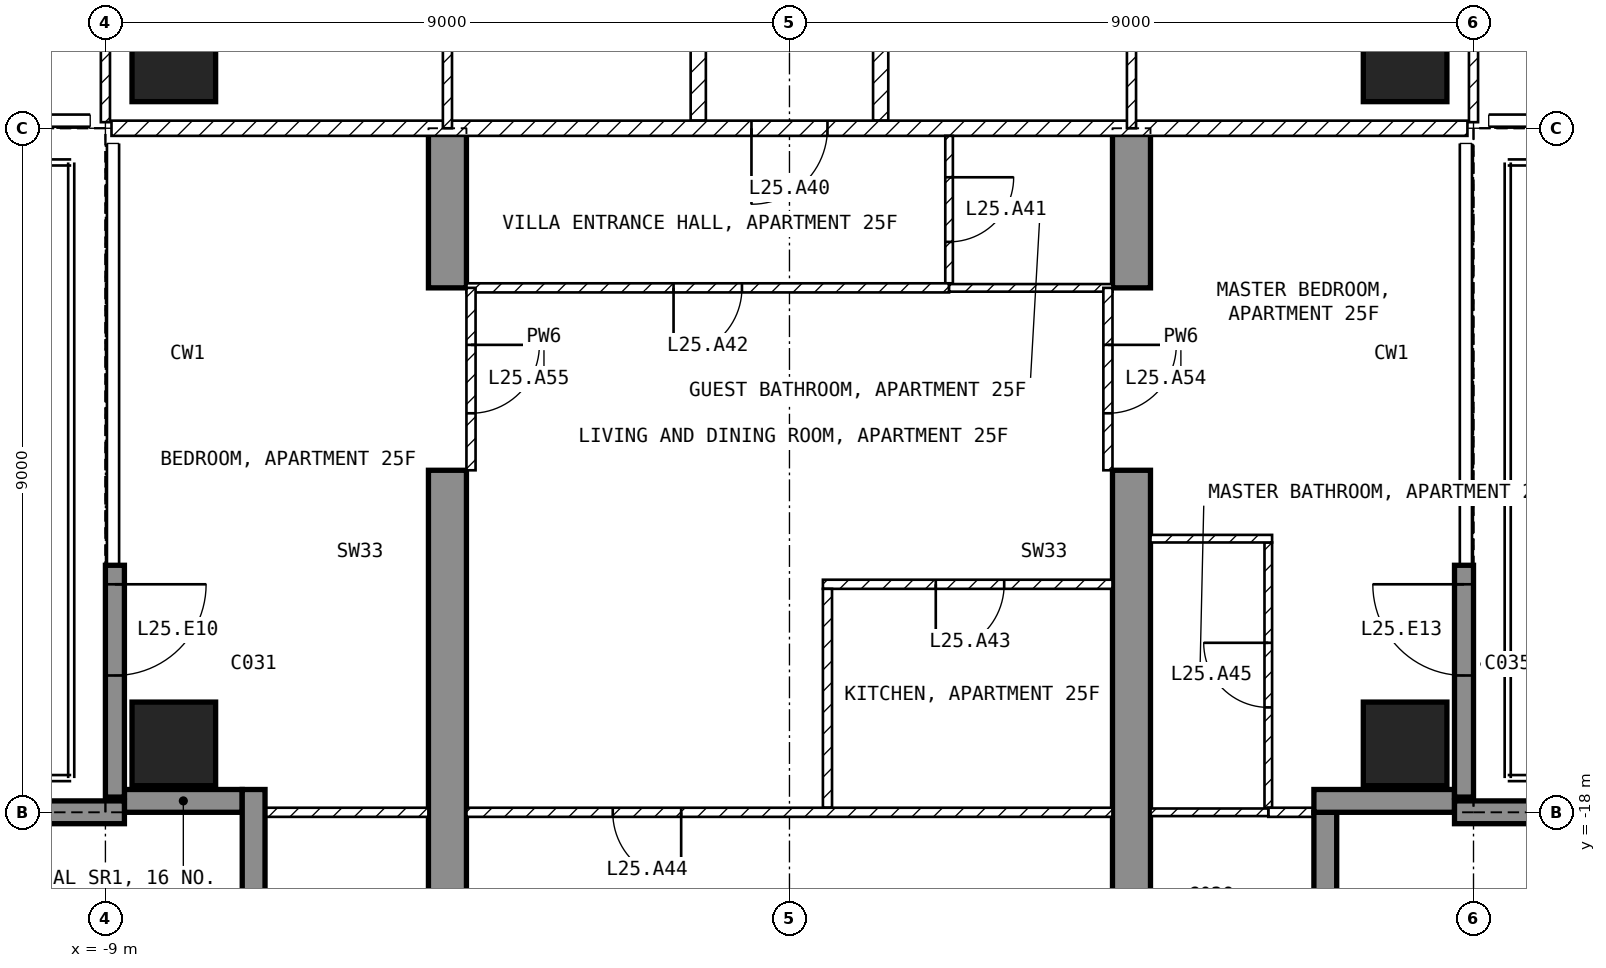
"""IFC4 building model, lengths in metres.
Left out: names, types, materials, properties, quantities, classifications, styles, units other than length and angle.
Written with IfcOpenShell. Run it as: python <this file> out.ifc"""

import sys

from ifc_helpers import new_model, si_unit, direction, frame, frame_2d, origin, origin_2d, place, context, subcontext, project, spatial, polyline, rectangle, outline, extrude, element, fill, save


model = new_model("IFC4")
c1 = context("Model", 3, precision=1e-05, world=origin(), true_north=direction((0.0, 1.0)))
c2 = subcontext(c1, "Body", "Model", "MODEL_VIEW")
j1 = project(units=[si_unit("LENGTHUNIT", "METRE"), si_unit("PLANEANGLEUNIT", "RADIAN")], contexts=[c1])
p1 = place(None, origin())
s1 = spatial("IfcSite", under=j1, at=p1, CompositionType="ELEMENT")
p2 = place(p1, origin())
s2 = spatial("IfcBuilding", under=s1, at=p2, CompositionType="ELEMENT")
p3 = place(p2, frame((0.0, 0.0, 109.4)))
s3 = spatial("IfcBuildingStorey", under=s2, at=p3, CompositionType="ELEMENT", Elevation=109.4)
for number, where, z_axis, x_axis in (
    (1, (-8.1, -17.1, -0.25), (0.0, 0.0, 1.0), (1.0, 0.0, 0.0)),
    (2, (-8.1, -8.1, -0.25), (0.0, 0.0, 1.0), (1.0, 0.0, 0.0)),
    (3, (8.1, -17.1, -0.25), (0.0, 0.0, 1.0), (1.0, 0.0, 0.0)),
    (4, (8.1, -8.1, -0.25), (0.0, 0.0, 1.0), (1.0, 0.0, 0.0)),
):
    element("IfcColumn", number, at=place(p3, frame(where, z_axis=z_axis, x_axis=x_axis)), inside=s3, PredefinedType="COLUMN", context=c2, shape_type="SweptSolid", body=[
        extrude(rectangle(XDim=1.1, YDim=1.1, at=origin_2d()), origin(), (0.0, 0.0, 1.0), 3.5),
    ])
for number, where, z_axis, x_axis in (
    (5, (-4.75, -20.15, -0.25), (1.0, 0.0, 0.0), (0.0, 1.0, 0.0)),
    (6, (4.25, -20.15, -0.25), (1.0, 0.0, 0.0), (0.0, 1.0, 0.0)),
):
    element("IfcWall", number, at=place(p3, frame(where, z_axis=z_axis, x_axis=x_axis)), inside=s3, PredefinedType="SHEAR", context=c2, shape_type="SweptSolid", body=[
        extrude(outline(polyline([(0.0, 0.0), (6.65, 0.0), (6.65, 2.65), (9.05, 2.65), (9.05, 0.0), (11.15, 0.0), (11.15, 3.5), (0.0, 3.5), (0.0, 0.0)])), origin(), (0.0, 0.0, 1.0), 0.5),
    ])
p4 = place(p3, frame((-8.875, -14.75, 0.0), z_axis=(0.0, 0.0, 1.0), x_axis=(0.0, -1.0, 0.0)))
e7 = element("IfcWall", 7, at=p4, inside=s3, PredefinedType="SOLIDWALL", context=c2, shape_type="SweptSolid", body=[
    extrude(rectangle(XDim=3.05, YDim=0.25, at=frame_2d((1.525, 0.0))), origin(), (0.0, 0.0, 1.0), 3.25),
])
p5 = place(p4, frame((0.25, 0.0, 0.0)))
e8 = element("IfcOpeningElement", 8, at=p5, cuts=e7, PredefinedType="OPENING", context=c2, shape_type="SweptSolid", body=[
    extrude(rectangle(XDim=1.2, YDim=2.4, at=frame_2d((0.6, 1.2))), frame((0.0, 0.135, 0.0), z_axis=(0.0, -1.0, 0.0), x_axis=(1.0, 0.0, 0.0)), (0.0, 0.0, 1.0), 0.27),
])
p6 = place(p3, frame((8.875, -17.8, 0.0), z_axis=(0.0, 0.0, 1.0), x_axis=(0.0, 1.0, 0.0)))
e9 = element("IfcWall", 9, at=p6, inside=s3, PredefinedType="SOLIDWALL", context=c2, shape_type="SweptSolid", body=[
    extrude(rectangle(XDim=3.05, YDim=0.25, at=frame_2d((1.525, 0.0))), origin(), (0.0, 0.0, 1.0), 3.25),
])
p7 = place(p6, frame((1.6, 0.0, 0.0)))
e10 = element("IfcOpeningElement", 10, at=p7, cuts=e9, PredefinedType="OPENING", context=c2, shape_type="SweptSolid", body=[
    extrude(rectangle(XDim=1.2, YDim=2.4, at=frame_2d((0.6, 1.2))), frame((0.0, 0.135, 0.0), z_axis=(0.0, -1.0, 0.0), x_axis=(1.0, 0.0, 0.0)), (0.0, 0.0, 1.0), 0.27),
])
p8 = place(p3, frame((7.05, -19.8, 0.0), z_axis=(0.0, 0.0, 1.0), x_axis=(0.0, 1.0, 0.0)))
e11 = element("IfcWall", 11, at=p8, inside=s3, PredefinedType="SOLIDWALL", context=c2, shape_type="SweptSolid", body=[
    extrude(rectangle(XDim=1.8, YDim=0.3, at=frame_2d((0.9, 0.0))), origin(), (0.0, 0.0, 1.0), 3.25),
])
p9 = place(p3, frame((6.9, -17.85, 0.0), z_axis=(0.0, 0.0, 1.0), x_axis=(1.0, 0.0, 0.0)))
e12 = element("IfcWall", 12, at=p9, inside=s3, PredefinedType="SOLIDWALL", context=c2, shape_type="SweptSolid", body=[
    extrude(rectangle(XDim=1.85, YDim=0.3, at=frame_2d((0.925, 0.0))), origin(), (0.0, 0.0, 1.0), 3.25),
])
p10 = place(p3, frame((-8.75, -17.85, 0.0), z_axis=(0.0, 0.0, 1.0), x_axis=(1.0, 0.0, 0.0)))
e13 = element("IfcWall", 13, at=p10, inside=s3, PredefinedType="SOLIDWALL", context=c2, shape_type="SweptSolid", body=[
    extrude(rectangle(XDim=1.55, YDim=0.3, at=frame_2d((0.775, 0.0))), origin(), (0.0, 0.0, 1.0), 3.25),
])
p11 = place(p3, frame((-7.05, -17.7, 0.0), z_axis=(0.0, 0.0, 1.0), x_axis=(0.0, -1.0, 0.0)))
e14 = element("IfcWall", 14, at=p11, inside=s3, PredefinedType="SOLIDWALL", context=c2, shape_type="SweptSolid", body=[
    extrude(rectangle(XDim=1.8, YDim=0.3, at=frame_2d((0.9, 0.0))), origin(), (0.0, 0.0, 1.0), 3.25),
])
for number, where, z_axis, x_axis in (
    (15, (-8.75, -18.0, 0.0), (0.0, 0.0, 1.0), (-1.0, 0.0, 0.0)),
    (16, (8.75, -18.0, 0.0), (0.0, 0.0, 1.0), (1.0, 0.0, 0.0)),
):
    element("IfcWall", number, at=place(p3, frame(where, z_axis=z_axis, x_axis=x_axis)), inside=s3, PredefinedType="SOLIDWALL", context=c2, shape_type="SweptSolid", body=[
        extrude(rectangle(XDim=2.99, YDim=0.3, at=frame_2d((1.495, 0.0))), origin(), (0.0, 0.0, 1.0), 3.25),
    ])
for number, where, z_axis, x_axis in (
    (17, (1.2, -4.6, 0.0), (0.0, 0.0, 1.0), (0.0, -1.0, 0.0)),
    (18, (-1.2, -8.9, 0.0), (0.0, 0.0, 1.0), (0.0, 1.0, 0.0)),
):
    element("IfcWall", number, at=place(p3, frame(where, z_axis=z_axis, x_axis=x_axis)), inside=s3, PredefinedType="PARTITIONING", context=c2, shape_type="SweptSolid", body=[
        extrude(rectangle(XDim=4.3, YDim=0.2, at=frame_2d((2.15, 0.0))), origin(), (0.0, 0.0, 1.0), 3.25),
    ])
p12 = place(p3, frame((8.92, -9.0, 0.0), z_axis=(0.0, 0.0, 1.0), x_axis=(-1.0, 0.0, 0.0)))
e19 = element("IfcWall", 19, at=p12, inside=s3, PredefinedType="PARTITIONING", context=c2, shape_type="SweptSolid", body=[
    extrude(rectangle(XDim=17.84, YDim=0.2, at=frame_2d((8.92, 0.0))), origin(), (0.0, 0.0, 1.0), 3.25),
])
p13 = place(p12, frame((8.42, 0.0, 0.0)))
e20 = element("IfcOpeningElement", 20, at=p13, cuts=e19, PredefinedType="OPENING", context=c2, shape_type="SweptSolid", body=[
    extrude(rectangle(XDim=1.0, YDim=2.1, at=frame_2d((0.5, 1.05))), frame((0.0, 0.11, 0.0), z_axis=(0.0, -1.0, 0.0), x_axis=(1.0, 0.0, 0.0)), (0.0, 0.0, 1.0), 0.22),
])
p14 = place(p3, frame((9.0, -8.92, 0.0), z_axis=(0.0, 0.0, 1.0), x_axis=(0.0, 1.0, 0.0)))
e21 = element("IfcWall", 21, at=p14, inside=s3, PredefinedType="PARTITIONING", context=c2, shape_type="SweptSolid", body=[
    extrude(rectangle(XDim=7.62, YDim=0.12, at=frame_2d((3.81, 0.0))), origin(), (0.0, 0.0, 1.0), 3.25),
])
p15 = place(p14, frame((2.52, 0.0, 0.0)))
e22 = element("IfcOpeningElement", 22, at=p15, cuts=e21, PredefinedType="OPENING", context=c2, shape_type="SweptSolid", body=[
    extrude(rectangle(XDim=0.9, YDim=2.1, at=frame_2d((0.45, 1.05))), frame((0.0, 0.07, 0.0), z_axis=(0.0, -1.0, 0.0), x_axis=(1.0, 0.0, 0.0)), (0.0, 0.0, 1.0), 0.14),
])
p16 = place(p3, frame((4.5, -9.0, 0.0), z_axis=(0.0, 0.0, 1.0), x_axis=(0.0, 1.0, 0.0)))
e23 = element("IfcWall", 23, at=p16, inside=s3, PredefinedType="PARTITIONING", context=c2, shape_type="SweptSolid", body=[
    extrude(rectangle(XDim=4.5, YDim=0.12, at=frame_2d((2.25, 0.0))), origin(), (0.0, 0.0, 1.0), 3.25),
])
p17 = place(p16, frame((1.8, 0.0, 0.0)))
e24 = element("IfcOpeningElement", 24, at=p17, cuts=e23, PredefinedType="OPENING", context=c2, shape_type="SweptSolid", body=[
    extrude(rectangle(XDim=0.9, YDim=2.1, at=frame_2d((0.45, 1.05))), frame((0.0, 0.07, 0.0), z_axis=(0.0, -1.0, 0.0), x_axis=(1.0, 0.0, 0.0)), (0.0, 0.0, 1.0), 0.14),
])
p18 = place(p3, frame((-9.0, -1.3, 0.0), z_axis=(0.0, 0.0, 1.0), x_axis=(0.0, -1.0, 0.0)))
e25 = element("IfcWall", 25, at=p18, inside=s3, PredefinedType="PARTITIONING", context=c2, shape_type="SweptSolid", body=[
    extrude(rectangle(XDim=7.62, YDim=0.12, at=frame_2d((3.81, 0.0))), origin(), (0.0, 0.0, 1.0), 3.25),
])
p19 = place(p18, frame((4.1, 0.0, 0.0)))
e26 = element("IfcOpeningElement", 26, at=p19, cuts=e25, PredefinedType="OPENING", context=c2, shape_type="SweptSolid", body=[
    extrude(rectangle(XDim=0.9, YDim=2.1, at=frame_2d((0.45, 1.05))), frame((0.0, 0.07, 0.0), z_axis=(0.0, -1.0, 0.0), x_axis=(1.0, 0.0, 0.0)), (0.0, 0.0, 1.0), 0.14),
])
p20 = place(p3, frame((-4.5, -4.5, 0.0), z_axis=(0.0, 0.0, 1.0), x_axis=(0.0, -1.0, 0.0)))
e27 = element("IfcWall", 27, at=p20, inside=s3, PredefinedType="PARTITIONING", context=c2, shape_type="SweptSolid", body=[
    extrude(rectangle(XDim=4.5, YDim=0.12, at=frame_2d((2.25, 0.0))), origin(), (0.0, 0.0, 1.0), 3.25),
])
p21 = place(p20, frame((1.8, 0.0, 0.0)))
e28 = element("IfcOpeningElement", 28, at=p21, cuts=e27, PredefinedType="OPENING", context=c2, shape_type="SweptSolid", body=[
    extrude(rectangle(XDim=0.9, YDim=2.1, at=frame_2d((0.45, 1.05))), frame((0.0, 0.07, 0.0), z_axis=(0.0, -1.0, 0.0), x_axis=(1.0, 0.0, 0.0)), (0.0, 0.0, 1.0), 0.14),
])
p22 = place(p3, frame((2.1, -9.1, 0.0), z_axis=(0.0, 0.0, 1.0), x_axis=(0.0, -1.0, 0.0)))
e29 = element("IfcWall", 29, at=p22, inside=s3, PredefinedType="PARTITIONING", context=c2, shape_type="SweptSolid", body=[
    extrude(rectangle(XDim=1.94, YDim=0.1, at=frame_2d((0.97, 0.0))), origin(), (0.0, 0.0, 1.0), 3.25),
])
p23 = place(p22, frame((0.545, 0.0, 0.0)))
e30 = element("IfcOpeningElement", 30, at=p23, cuts=e29, PredefinedType="OPENING", context=c2, shape_type="SweptSolid", body=[
    extrude(rectangle(XDim=0.85, YDim=2.1, at=frame_2d((0.425, 1.05))), frame((0.0, 0.06, 0.0), z_axis=(0.0, -1.0, 0.0), x_axis=(1.0, 0.0, 0.0)), (0.0, 0.0, 1.0), 0.12),
])
p24 = place(p3, frame((2.1, -11.1, 0.0), z_axis=(0.0, 0.0, 1.0), x_axis=(-1.0, 0.0, 0.0)))
e31 = element("IfcWall", 31, at=p24, inside=s3, PredefinedType="PARTITIONING", context=c2, shape_type="SweptSolid", body=[
    extrude(rectangle(XDim=6.35, YDim=0.12, at=frame_2d((3.175, 0.0))), origin(), (0.0, 0.0, 1.0), 3.25),
])
p25 = place(p24, frame((2.725, 0.0, 0.0)))
e32 = element("IfcOpeningElement", 32, at=p25, cuts=e31, PredefinedType="OPENING", context=c2, shape_type="SweptSolid", body=[
    extrude(rectangle(XDim=0.9, YDim=2.1, at=frame_2d((0.45, 1.05))), frame((0.0, 0.07, 0.0), z_axis=(0.0, -1.0, 0.0), x_axis=(1.0, 0.0, 0.0)), (0.0, 0.0, 1.0), 0.14),
])
p26 = place(p3, frame((4.25, -11.1, 0.0), z_axis=(0.0, 0.0, 1.0), x_axis=(-1.0, 0.0, 0.0)))
e33 = element("IfcWall", 33, at=p26, inside=s3, PredefinedType="PARTITIONING", context=c2, shape_type="SweptSolid", body=[
    extrude(rectangle(XDim=2.15, YDim=0.1, at=frame_2d((1.075, 0.0))), origin(), (0.0, 0.0, 1.0), 3.25),
])
p27 = place(p3, frame((4.25, -15.0, 0.0), z_axis=(0.0, 0.0, 1.0), x_axis=(-1.0, 0.0, 0.0)))
e34 = element("IfcWall", 34, at=p27, inside=s3, PredefinedType="PARTITIONING", context=c2, shape_type="SweptSolid", body=[
    extrude(rectangle(XDim=3.81, YDim=0.12, at=frame_2d((1.905, 0.0))), origin(), (0.0, 0.0, 1.0), 3.25),
])
p28 = place(p27, frame((1.425, 0.0, 0.0)))
e35 = element("IfcOpeningElement", 35, at=p28, cuts=e34, PredefinedType="OPENING", context=c2, shape_type="SweptSolid", body=[
    extrude(rectangle(XDim=0.9, YDim=2.1, at=frame_2d((0.45, 1.05))), frame((0.0, 0.07, 0.0), z_axis=(0.0, -1.0, 0.0), x_axis=(1.0, 0.0, 0.0)), (0.0, 0.0, 1.0), 0.14),
])
p29 = place(p3, frame((0.5, -15.06, 0.0), z_axis=(0.0, 0.0, 1.0), x_axis=(0.0, -1.0, 0.0)))
e36 = element("IfcWall", 36, at=p29, inside=s3, PredefinedType="PARTITIONING", context=c2, shape_type="SweptSolid", body=[
    extrude(rectangle(XDim=2.88, YDim=0.12, at=frame_2d((1.44, 0.0))), origin(), (0.0, 0.0, 1.0), 3.25),
])
p30 = place(p3, frame((4.25, -18.0, 0.0), z_axis=(0.0, 0.0, 1.0), x_axis=(-1.0, 0.0, 0.0)))
e37 = element("IfcWall", 37, at=p30, inside=s3, PredefinedType="PARTITIONING", context=c2, shape_type="SweptSolid", body=[
    extrude(rectangle(XDim=8.5, YDim=0.12, at=frame_2d((4.25, 0.0))), origin(), (0.0, 0.0, 1.0), 3.25),
])
p31 = place(p30, frame((5.675, 0.0, 0.0)))
e38 = element("IfcOpeningElement", 38, at=p31, cuts=e37, PredefinedType="OPENING", context=c2, shape_type="SweptSolid", body=[
    extrude(rectangle(XDim=0.9, YDim=2.1, at=frame_2d((0.45, 1.05))), frame((0.0, 0.07, 0.0), z_axis=(0.0, -1.0, 0.0), x_axis=(1.0, 0.0, 0.0)), (0.0, 0.0, 1.0), 0.14),
])
p32 = place(p3, frame((6.3, -17.94, 0.0), z_axis=(0.0, 0.0, 1.0), x_axis=(0.0, 1.0, 0.0)))
e39 = element("IfcWall", 39, at=p32, inside=s3, PredefinedType="PARTITIONING", context=c2, shape_type="SweptSolid", body=[
    extrude(rectangle(XDim=3.49, YDim=0.1, at=frame_2d((1.745, 0.0))), origin(), (0.0, 0.0, 1.0), 3.25),
])
p33 = place(p32, frame((1.32, 0.0, 0.0)))
e40 = element("IfcOpeningElement", 40, at=p33, cuts=e39, PredefinedType="OPENING", context=c2, shape_type="SweptSolid", body=[
    extrude(rectangle(XDim=0.85, YDim=2.1, at=frame_2d((0.425, 1.05))), frame((0.0, 0.06, 0.0), z_axis=(0.0, -1.0, 0.0), x_axis=(1.0, 0.0, 0.0)), (0.0, 0.0, 1.0), 0.12),
])
p34 = place(p3, frame((6.35, -14.4, 0.0), z_axis=(0.0, 0.0, 1.0), x_axis=(-1.0, 0.0, 0.0)))
e41 = element("IfcWall", 41, at=p34, inside=s3, PredefinedType="PARTITIONING", context=c2, shape_type="SweptSolid", body=[
    extrude(rectangle(XDim=1.6, YDim=0.1, at=frame_2d((0.8, 0.0))), origin(), (0.0, 0.0, 1.0), 3.25),
])
p35 = place(p3, frame((7.12, -18.0, 0.0), z_axis=(0.0, 0.0, 1.0), x_axis=(-1.0, 0.0, 0.0)))
e42 = element("IfcWall", 42, at=p35, inside=s3, PredefinedType="PARTITIONING", context=c2, shape_type="SweptSolid", body=[
    extrude(rectangle(XDim=0.82, YDim=0.12, at=frame_2d((0.41, 0.0))), origin(), (0.0, 0.0, 1.0), 3.25),
])
p36 = place(p3, frame((6.3, -18.0, 0.0), z_axis=(0.0, 0.0, 1.0), x_axis=(-1.0, 0.0, 0.0)))
e43 = element("IfcWall", 43, at=p36, inside=s3, PredefinedType="PARTITIONING", context=c2, shape_type="SweptSolid", body=[
    extrude(rectangle(XDim=1.55, YDim=0.1, at=frame_2d((0.775, 0.0))), origin(), (0.0, 0.0, 1.0), 3.25),
])
p37 = place(p3, frame((-4.75, -18.0, 0.0), z_axis=(0.0, 0.0, 1.0), x_axis=(-1.0, 0.0, 0.0)))
e44 = element("IfcWall", 44, at=p37, inside=s3, PredefinedType="PARTITIONING", context=c2, shape_type="SweptSolid", body=[
    extrude(rectangle(XDim=2.37, YDim=0.12, at=frame_2d((1.185, 0.0))), origin(), (0.0, 0.0, 1.0), 3.25),
])
p38 = place(p3, frame((4.19, -11.1, 0.0), z_axis=(0.0, 0.0, 1.0), x_axis=(0.0, -1.0, 0.0)))
e45 = element("IfcWall", 45, at=p38, inside=s3, PredefinedType="PARTITIONING", context=c2, shape_type="SweptSolid", body=[
    extrude(rectangle(XDim=2.4, YDim=0.12, at=frame_2d((1.2, 0.0))), origin(), (0.0, 0.0, 1.0), 2.4),
])
p39 = place(p38, frame((0.75, 0.0, 0.0)))
e46 = element("IfcOpeningElement", 46, at=p39, cuts=e45, PredefinedType="OPENING", context=c2, shape_type="SweptSolid", body=[
    extrude(rectangle(XDim=0.9, YDim=2.1, at=frame_2d((0.45, 1.05))), frame((0.0, 0.07, 0.0), z_axis=(0.0, -1.0, 0.0), x_axis=(1.0, 0.0, 0.0)), (0.0, 0.0, 1.0), 0.14),
])
p40 = place(p3, frame((-4.19, -11.1, 0.0), z_axis=(0.0, 0.0, 1.0), x_axis=(0.0, -1.0, 0.0)))
e47 = element("IfcWall", 47, at=p40, inside=s3, PredefinedType="PARTITIONING", context=c2, shape_type="SweptSolid", body=[
    extrude(rectangle(XDim=2.4, YDim=0.12, at=frame_2d((1.2, 0.0))), origin(), (0.0, 0.0, 1.0), 2.4),
])
p41 = place(p40, frame((0.75, 0.0, 0.0)))
e48 = element("IfcOpeningElement", 48, at=p41, cuts=e47, PredefinedType="OPENING", context=c2, shape_type="SweptSolid", body=[
    extrude(rectangle(XDim=0.9, YDim=2.1, at=frame_2d((0.45, 1.05))), frame((0.0, 0.07, 0.0), z_axis=(0.0, -1.0, 0.0), x_axis=(1.0, 0.0, 0.0)), (0.0, 0.0, 1.0), 0.14),
])
p42 = place(p5, origin())
e49 = element("IfcDoor", 49, at=p42, inside=s3, OperationType="SINGLE_SWING_LEFT", PredefinedType="DOOR", context=c2, shape_type="SweptSolid", body=[
    extrude(rectangle(XDim=1.2, YDim=2.4, at=frame_2d((0.6, 1.2))), frame((0.0, 0.025, 0.0), z_axis=(0.0, -1.0, 0.0), x_axis=(1.0, 0.0, 0.0)), (0.0, 0.0, 1.0), 0.05),
])
fill(e8, e49)
p43 = place(p7, origin())
e50 = element("IfcDoor", 50, at=p43, inside=s3, OperationType="SINGLE_SWING_RIGHT", PredefinedType="DOOR", context=c2, shape_type="SweptSolid", body=[
    extrude(rectangle(XDim=1.2, YDim=2.4, at=frame_2d((0.6, 1.2))), frame((0.0, 0.025, 0.0), z_axis=(0.0, -1.0, 0.0), x_axis=(1.0, 0.0, 0.0)), (0.0, 0.0, 1.0), 0.05),
])
fill(e10, e50)
p44 = place(p13, origin())
e51 = element("IfcDoor", 51, at=p44, inside=s3, OperationType="SINGLE_SWING_RIGHT", PredefinedType="DOOR", context=c2, shape_type="SweptSolid", body=[
    extrude(rectangle(XDim=1.0, YDim=2.1, at=frame_2d((0.5, 1.05))), frame((0.0, 0.025, 0.0), z_axis=(0.0, -1.0, 0.0), x_axis=(1.0, 0.0, 0.0)), (0.0, 0.0, 1.0), 0.05),
])
fill(e20, e51)
p45 = place(p23, origin())
e52 = element("IfcDoor", 52, at=p45, inside=s3, OperationType="SINGLE_SWING_LEFT", PredefinedType="DOOR", context=c2, shape_type="SweptSolid", body=[
    extrude(rectangle(XDim=0.85, YDim=2.1, at=frame_2d((0.425, 1.05))), frame((0.0, 0.025, 0.0), z_axis=(0.0, -1.0, 0.0), x_axis=(1.0, 0.0, 0.0)), (0.0, 0.0, 1.0), 0.05),
])
fill(e30, e52)
p46 = place(p25, origin())
e53 = element("IfcDoor", 53, at=p46, inside=s3, OperationType="SINGLE_SWING_RIGHT", PredefinedType="DOOR", context=c2, shape_type="SweptSolid", body=[
    extrude(rectangle(XDim=0.9, YDim=2.1, at=frame_2d((0.45, 1.05))), frame((0.0, 0.025, 0.0), z_axis=(0.0, -1.0, 0.0), x_axis=(1.0, 0.0, 0.0)), (0.0, 0.0, 1.0), 0.05),
])
fill(e32, e53)
p47 = place(p28, origin())
e54 = element("IfcDoor", 54, at=p47, inside=s3, OperationType="SINGLE_SWING_RIGHT", PredefinedType="DOOR", context=c2, shape_type="SweptSolid", body=[
    extrude(rectangle(XDim=0.9, YDim=2.1, at=frame_2d((0.45, 1.05))), frame((0.0, 0.025, 0.0), z_axis=(0.0, -1.0, 0.0), x_axis=(1.0, 0.0, 0.0)), (0.0, 0.0, 1.0), 0.05),
])
fill(e35, e54)
p48 = place(p31, origin())
e55 = element("IfcDoor", 55, at=p48, inside=s3, OperationType="SINGLE_SWING_LEFT", PredefinedType="DOOR", context=c2, shape_type="SweptSolid", body=[
    extrude(rectangle(XDim=0.9, YDim=2.1, at=frame_2d((0.45, 1.05))), frame((0.0, 0.025, 0.0), z_axis=(0.0, -1.0, 0.0), x_axis=(1.0, 0.0, 0.0)), (0.0, 0.0, 1.0), 0.05),
])
fill(e38, e55)
p49 = place(p33, origin())
e56 = element("IfcDoor", 56, at=p49, inside=s3, OperationType="SINGLE_SWING_RIGHT", PredefinedType="DOOR", context=c2, shape_type="SweptSolid", body=[
    extrude(rectangle(XDim=0.85, YDim=2.1, at=frame_2d((0.425, 1.05))), frame((0.0, 0.025, 0.0), z_axis=(0.0, -1.0, 0.0), x_axis=(1.0, 0.0, 0.0)), (0.0, 0.0, 1.0), 0.05),
])
fill(e40, e56)
p50 = place(p39, origin())
e57 = element("IfcDoor", 57, at=p50, inside=s3, OperationType="SINGLE_SWING_LEFT", PredefinedType="DOOR", context=c2, shape_type="SweptSolid", body=[
    extrude(rectangle(XDim=0.9, YDim=2.1, at=frame_2d((0.45, 1.05))), frame((0.0, 0.025, 0.0), z_axis=(0.0, -1.0, 0.0), x_axis=(1.0, 0.0, 0.0)), (0.0, 0.0, 1.0), 0.05),
])
fill(e46, e57)
p51 = place(p41, origin())
e58 = element("IfcDoor", 58, at=p51, inside=s3, OperationType="SINGLE_SWING_LEFT", PredefinedType="DOOR", context=c2, shape_type="SweptSolid", body=[
    extrude(rectangle(XDim=0.9, YDim=2.1, at=frame_2d((0.45, 1.05))), frame((0.0, 0.025, 0.0), z_axis=(0.0, -1.0, 0.0), x_axis=(1.0, 0.0, 0.0)), (0.0, 0.0, 1.0), 0.05),
])
fill(e48, e58)
save(model, sys.argv[1])
